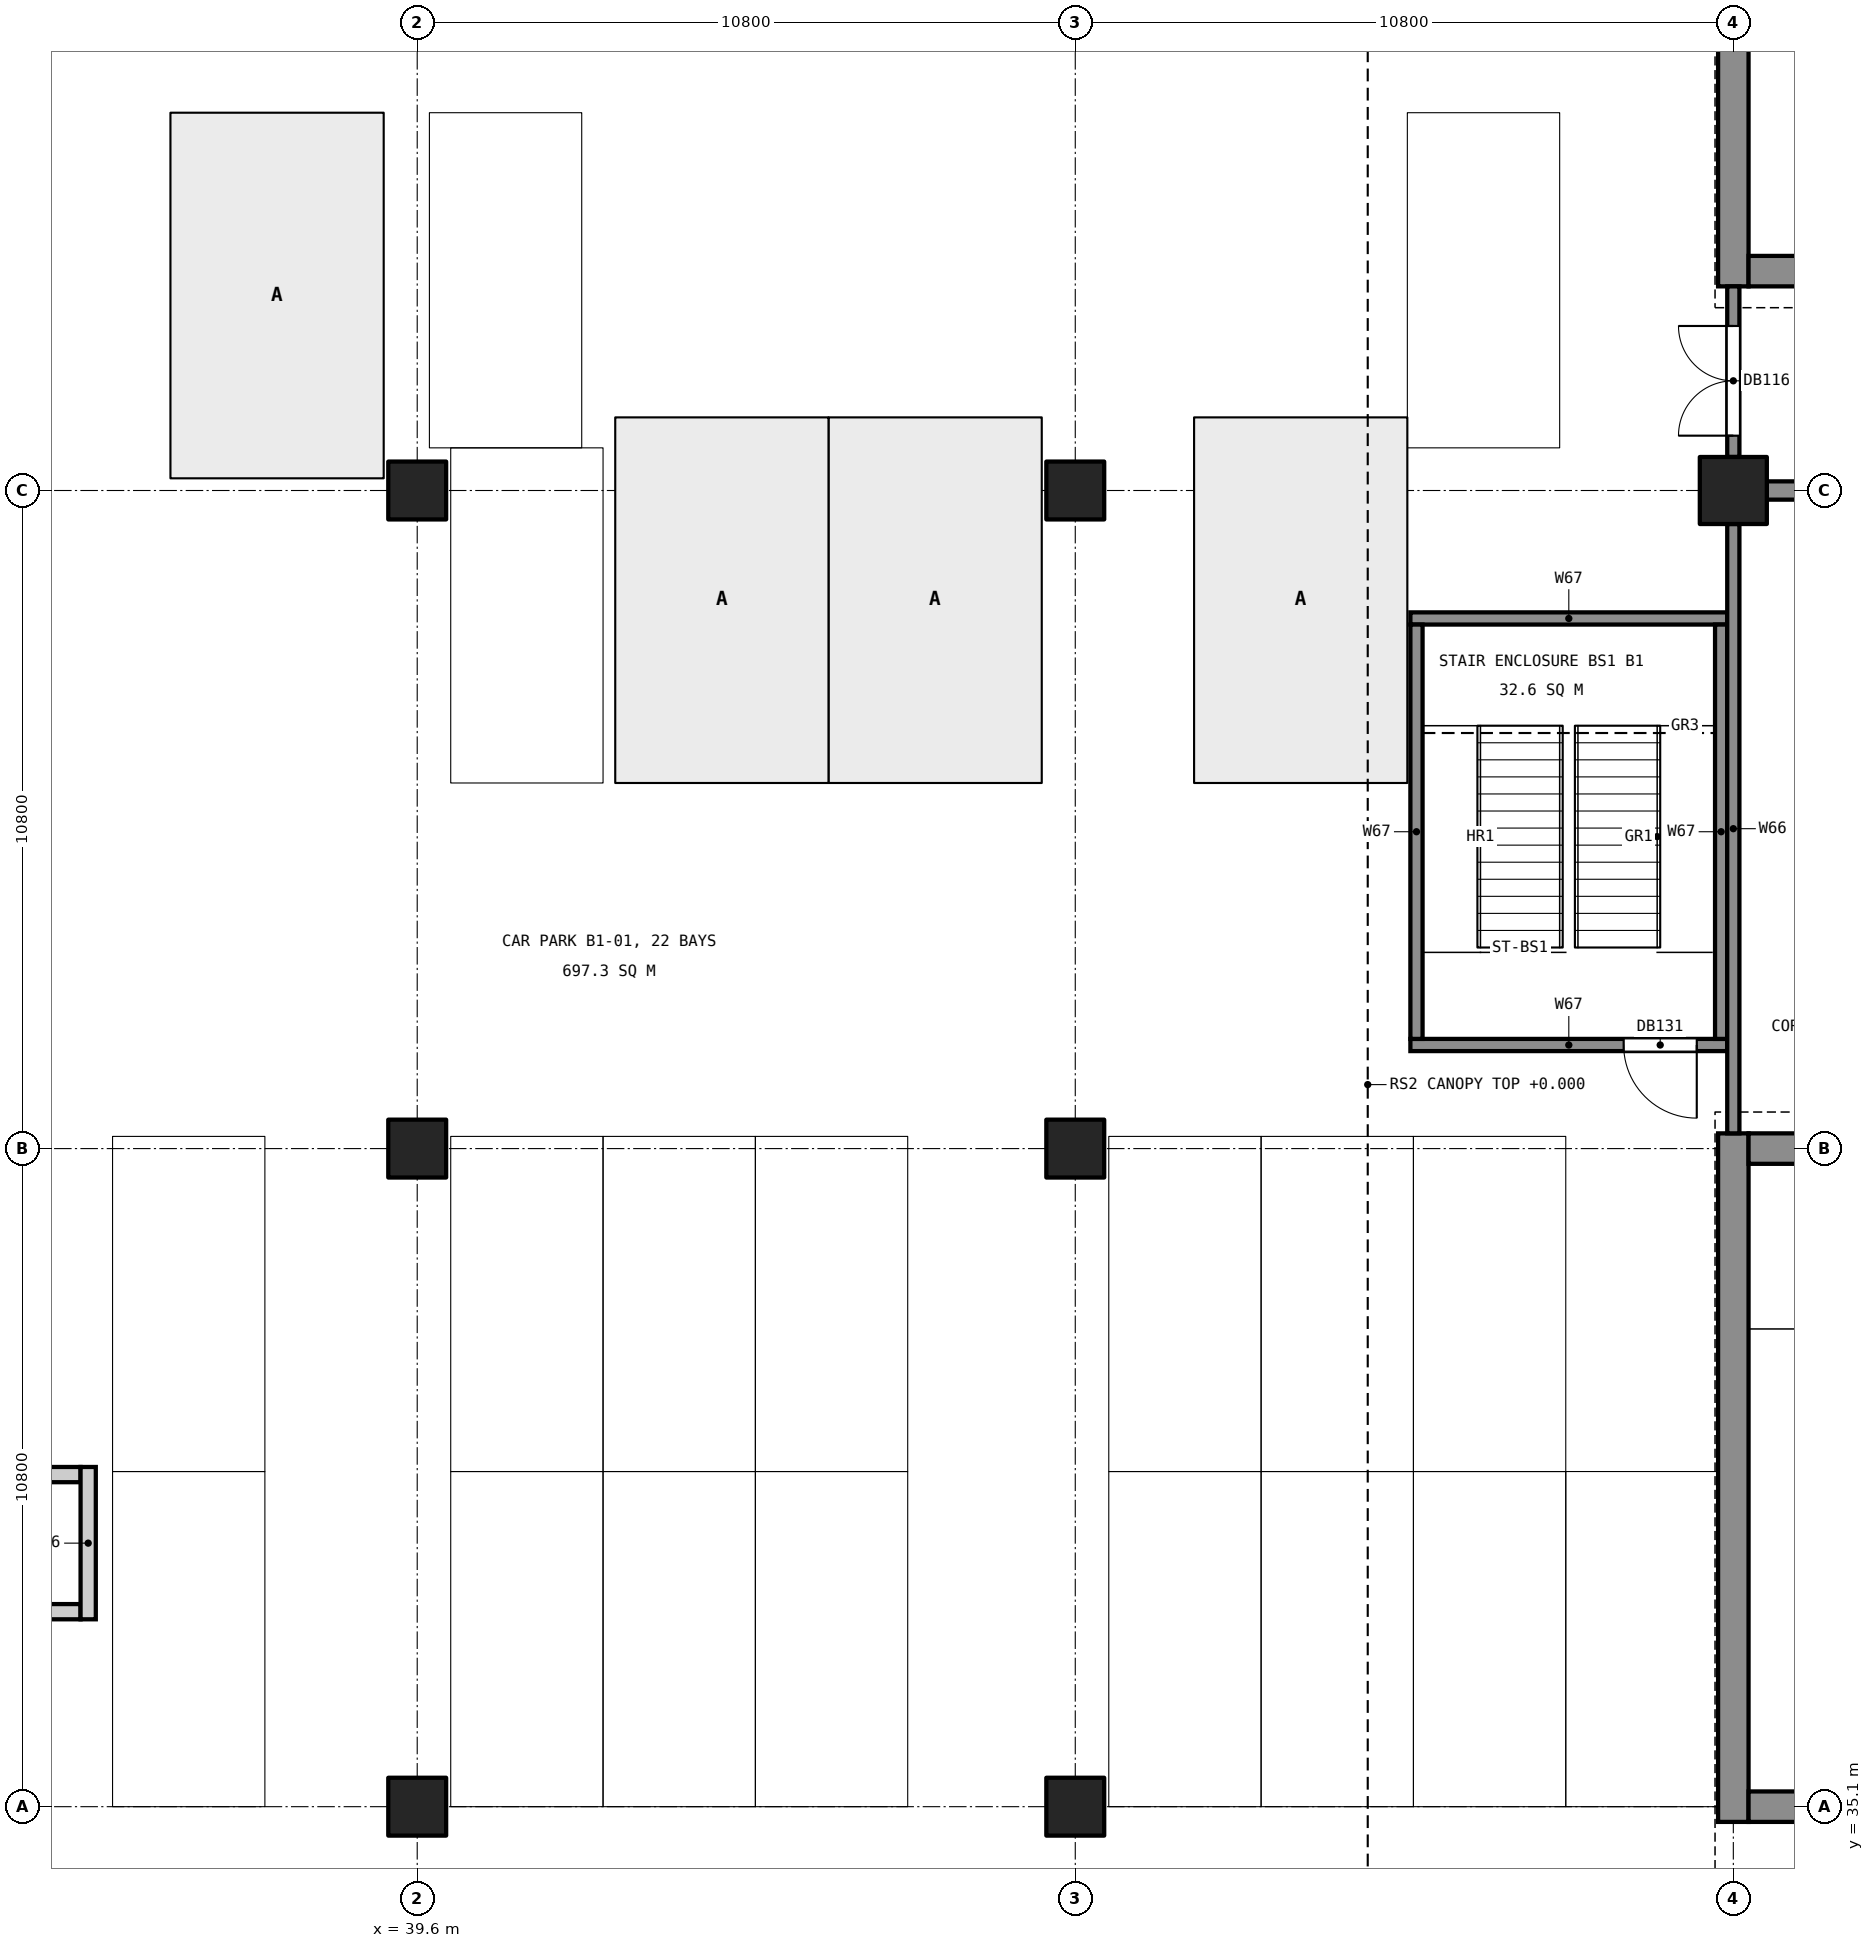
"""IFC4 building model, lengths in metres.
Left out: names, types, materials, properties, quantities, classifications, styles, units other than length and angle.
Written with IfcOpenShell. Run it as: python <this file> out.ifc"""

import sys

from ifc_helpers import new_model, si_unit, direction, frame, frame_2d, origin, origin_2d, place, context, subcontext, project, spatial, rectangle, extrude, element, fill, save


model = new_model("IFC4")
c1 = context("Model", 3, precision=1e-05, world=origin(), true_north=direction((0.0, 1.0)))
c2 = subcontext(c1, "Body", "Model", "MODEL_VIEW")
j1 = project(units=[si_unit("LENGTHUNIT", "METRE"), si_unit("PLANEANGLEUNIT", "RADIAN")], contexts=[c1])
p1 = place(None, origin())
s1 = spatial("IfcSite", under=j1, at=p1, CompositionType="ELEMENT")
p2 = place(p1, origin())
s2 = spatial("IfcBuilding", under=s1, at=p2, CompositionType="ELEMENT")
p3 = place(p2, frame((0.0, 0.0, -4.8)))
s3 = spatial("IfcBuildingStorey", under=s2, at=p3, CompositionType="ELEMENT", Elevation=-4.8)
p4 = place(p3, frame((61.2, 56.7, 0.0), z_axis=(0.0, 0.0, 1.0), x_axis=(1.0, 0.0, 0.0)))
e1 = element("IfcColumn", 1, at=p4, inside=s3, PredefinedType="COLUMN", context=c2, shape_type="SweptSolid", body=[
    extrude(rectangle(XDim=1.1, YDim=1.1, at=origin_2d()), origin(), (0.0, 0.0, 1.0), 4.5),
])
for number, where, z_axis, x_axis in (
    (2, (39.6, 35.1, 0.0), (0.0, 0.0, 1.0), (1.0, 0.0, 0.0)),
    (3, (39.6, 45.9, 0.0), (0.0, 0.0, 1.0), (1.0, 0.0, 0.0)),
    (4, (39.6, 56.7, 0.0), (0.0, 0.0, 1.0), (1.0, 0.0, 0.0)),
    (5, (50.4, 35.1, 0.0), (0.0, 0.0, 1.0), (1.0, 0.0, 0.0)),
    (6, (50.4, 45.9, 0.0), (0.0, 0.0, 1.0), (1.0, 0.0, 0.0)),
    (7, (50.4, 56.7, 0.0), (0.0, 0.0, 1.0), (1.0, 0.0, 0.0)),
):
    element("IfcColumn", number, at=place(p3, frame(where, z_axis=z_axis, x_axis=x_axis)), inside=s3, PredefinedType="COLUMN", context=c2, shape_type="SweptSolid", body=[
        extrude(rectangle(XDim=0.95, YDim=0.95, at=origin_2d()), origin(), (0.0, 0.0, 1.0), 4.35),
    ])
p5 = place(p3, frame((61.2, 34.85, 0.0), z_axis=(0.0, 0.0, 1.0), x_axis=(0.0, 1.0, 0.0)))
e8 = element("IfcWall", 8, at=p5, inside=s3, PredefinedType="SHEAR", context=c2, shape_type="SweptSolid", body=[
    extrude(rectangle(XDim=11.3, YDim=0.5, at=frame_2d((5.65, 0.0))), origin(), (0.0, 0.0, 1.0), 4.5),
])
for number, where, z_axis, x_axis in (
    (9, (61.45, 35.1, 0.0), (0.0, 0.0, 1.0), (1.0, 0.0, 0.0)),
    (10, (61.45, 45.9, 0.0), (0.0, 0.0, 1.0), (1.0, 0.0, 0.0)),
):
    element("IfcWall", number, at=place(p3, frame(where, z_axis=z_axis, x_axis=x_axis)), inside=s3, PredefinedType="SHEAR", context=c2, shape_type="SweptSolid", body=[
        extrude(rectangle(XDim=4.0, YDim=0.5, at=frame_2d((2.0, 0.0))), origin(), (0.0, 0.0, 1.0), 4.5),
    ])
p6 = place(p3, frame((61.2, 60.05, 0.0), z_axis=(0.0, 0.0, 1.0), x_axis=(0.0, 1.0, 0.0)))
e11 = element("IfcWall", 11, at=p6, inside=s3, PredefinedType="SHEAR", context=c2, shape_type="SweptSolid", body=[
    extrude(rectangle(XDim=14.9, YDim=0.5, at=frame_2d((7.45, 0.0))), origin(), (0.0, 0.0, 1.0), 4.5),
])
p7 = place(p3, frame((61.45, 60.3, 0.0), z_axis=(0.0, 0.0, 1.0), x_axis=(1.0, 0.0, 0.0)))
e12 = element("IfcWall", 12, at=p7, inside=s3, PredefinedType="SHEAR", context=c2, shape_type="SweptSolid", body=[
    extrude(rectangle(XDim=4.0, YDim=0.5, at=frame_2d((2.0, 0.0))), origin(), (0.0, 0.0, 1.0), 4.5),
])
p8 = place(p3, frame((61.75, 56.7, 0.0), z_axis=(0.0, 0.0, 1.0), x_axis=(1.0, 0.0, 0.0)))
e13 = element("IfcWall", 13, at=p8, inside=s3, PredefinedType="SHEAR", context=c2, shape_type="SweptSolid", body=[
    extrude(rectangle(XDim=6.1, YDim=0.3, at=frame_2d((3.05, 0.0))), origin(), (0.0, 0.0, 1.0), 4.5),
])
p9 = place(p8, frame((2.15, 0.0, 0.0)))
e14 = element("IfcOpeningElement", 14, at=p9, cuts=e13, PredefinedType="OPENING", context=c2, shape_type="SweptSolid", body=[
    extrude(rectangle(XDim=1.8, YDim=2.1, at=frame_2d((0.9, 1.05))), frame((0.0, 0.16, 0.0), z_axis=(0.0, -1.0, 0.0), x_axis=(1.0, 0.0, 0.0)), (0.0, 0.0, 1.0), 0.32),
])
for number, where, z_axis, x_axis in (
    (15, (32.075, 38.3, 0.0), (0.0, 0.0, 1.0), (1.0, 0.0, 0.0)),
    (16, (32.075, 40.55, 0.0), (0.0, 0.0, 1.0), (1.0, 0.0, 0.0)),
):
    element("IfcWall", number, at=place(p3, frame(where, z_axis=z_axis, x_axis=x_axis)), inside=s3, PredefinedType="SOLIDWALL", context=c2, shape_type="SweptSolid", body=[
        extrude(rectangle(XDim=2.0, YDim=0.25, at=frame_2d((1.0, 0.0))), origin(), (0.0, 0.0, 1.0), 4.35),
    ])
p10 = place(p3, frame((34.2, 38.175, 0.0), z_axis=(0.0, 0.0, 1.0), x_axis=(0.0, 1.0, 0.0)))
e17 = element("IfcWall", 17, at=p10, inside=s3, PredefinedType="SOLIDWALL", context=c2, shape_type="SweptSolid", body=[
    extrude(rectangle(XDim=2.5, YDim=0.25, at=frame_2d((1.25, 0.0))), origin(), (0.0, 0.0, 1.0), 4.35),
])
p11 = place(p3, frame((55.9, 47.6, 0.0), z_axis=(0.0, 0.0, 1.0), x_axis=(1.0, 0.0, 0.0)))
e18 = element("IfcWall", 18, at=p11, inside=s3, PredefinedType="SOLIDWALL", context=c2, shape_type="SweptSolid", body=[
    extrude(rectangle(XDim=5.2, YDim=0.2, at=frame_2d((2.6, 0.0))), origin(), (0.0, 0.0, 1.0), 4.35),
])
p12 = place(p11, frame((3.5, 0.0, 0.0)))
e19 = element("IfcOpeningElement", 19, at=p12, cuts=e18, PredefinedType="OPENING", context=c2, shape_type="SweptSolid", body=[
    extrude(rectangle(XDim=1.2, YDim=2.1, at=frame_2d((0.6, 1.05))), frame((0.0, 0.11, 0.0), z_axis=(0.0, -1.0, 0.0), x_axis=(1.0, 0.0, 0.0)), (0.0, 0.0, 1.0), 0.22),
])
p13 = place(p3, frame((55.9, 54.6, 0.0), z_axis=(0.0, 0.0, 1.0), x_axis=(1.0, 0.0, 0.0)))
e20 = element("IfcWall", 20, at=p13, inside=s3, PredefinedType="SOLIDWALL", context=c2, shape_type="SweptSolid", body=[
    extrude(rectangle(XDim=5.2, YDim=0.2, at=frame_2d((2.6, 0.0))), origin(), (0.0, 0.0, 1.0), 4.35),
])
p14 = place(p3, frame((56.0, 47.7, 0.0), z_axis=(0.0, 0.0, 1.0), x_axis=(0.0, 1.0, 0.0)))
e21 = element("IfcWall", 21, at=p14, inside=s3, PredefinedType="SOLIDWALL", context=c2, shape_type="SweptSolid", body=[
    extrude(rectangle(XDim=6.8, YDim=0.2, at=frame_2d((3.4, 0.0))), origin(), (0.0, 0.0, 1.0), 4.35),
])
p15 = place(p3, frame((61.0, 47.7, 0.0), z_axis=(0.0, 0.0, 1.0), x_axis=(0.0, 1.0, 0.0)))
e22 = element("IfcWall", 22, at=p15, inside=s3, PredefinedType="SOLIDWALL", context=c2, shape_type="SweptSolid", body=[
    extrude(rectangle(XDim=6.8, YDim=0.2, at=frame_2d((3.4, 0.0))), origin(), (0.0, 0.0, 1.0), 4.5),
])
p16 = place(p3, frame((61.2, 46.15, 0.0), z_axis=(0.0, 0.0, 1.0), x_axis=(0.0, 1.0, 0.0)))
e23 = element("IfcWall", 23, at=p16, inside=s3, PredefinedType="SOLIDWALL", context=c2, shape_type="SweptSolid", body=[
    extrude(rectangle(XDim=10.0, YDim=0.2, at=frame_2d((5.0, 0.0))), origin(), (0.0, 0.0, 1.0), 4.5),
])
p17 = place(p3, frame((61.2, 57.25, 0.0), z_axis=(0.0, 0.0, 1.0), x_axis=(0.0, 1.0, 0.0)))
e24 = element("IfcWall", 24, at=p17, inside=s3, PredefinedType="SOLIDWALL", context=c2, shape_type="SweptSolid", body=[
    extrude(rectangle(XDim=2.8, YDim=0.2, at=frame_2d((1.4, 0.0))), origin(), (0.0, 0.0, 1.0), 4.5),
])
p18 = place(p17, frame((0.35, 0.0, 0.0)))
e25 = element("IfcOpeningElement", 25, at=p18, cuts=e24, PredefinedType="OPENING", context=c2, shape_type="SweptSolid", body=[
    extrude(rectangle(XDim=1.8, YDim=2.1, at=frame_2d((0.9, 1.05))), frame((0.0, 0.11, 0.0), z_axis=(0.0, -1.0, 0.0), x_axis=(1.0, 0.0, 0.0)), (0.0, 0.0, 1.0), 0.22),
])
p19 = place(p18, origin())
e26 = element("IfcDoor", 26, at=p19, inside=s3, OperationType="DOUBLE_DOOR_SINGLE_SWING", PredefinedType="DOOR", context=c2, shape_type="SweptSolid", body=[
    extrude(rectangle(XDim=1.8, YDim=2.1, at=frame_2d((0.9, 1.05))), frame((0.0, 0.025, 0.0), z_axis=(0.0, -1.0, 0.0), x_axis=(1.0, 0.0, 0.0)), (0.0, 0.0, 1.0), 0.05),
])
fill(e25, e26)
p20 = place(p12, frame((1.2, 0.0, 0.0), z_axis=(0.0, 0.0, 1.0), x_axis=(-1.0, 0.0, 0.0)))
e27 = element("IfcDoor", 27, at=p20, inside=s3, OperationType="SINGLE_SWING_LEFT", PredefinedType="DOOR", context=c2, shape_type="SweptSolid", body=[
    extrude(rectangle(XDim=1.2, YDim=2.1, at=frame_2d((0.6, 1.05))), frame((0.0, 0.025, 0.0), z_axis=(0.0, -1.0, 0.0), x_axis=(1.0, 0.0, 0.0)), (0.0, 0.0, 1.0), 0.05),
])
fill(e19, e27)
save(model, sys.argv[1])
